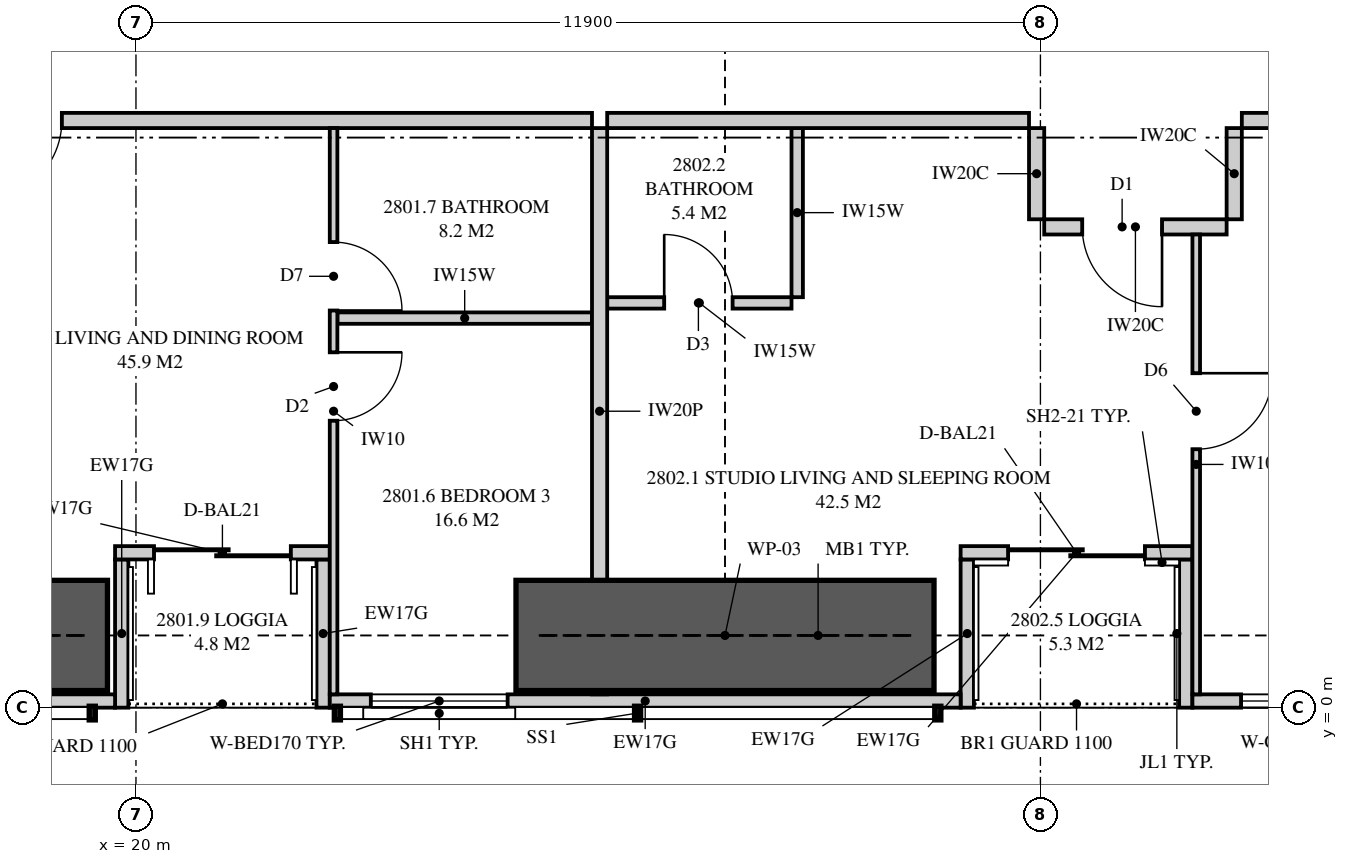
"""IFC4 building model, lengths in metres.
Left out: names, types, materials, properties, quantities, classifications, styles, units other than length and angle.
Written with IfcOpenShell. Run it as: python <this file> out.ifc"""

import sys

from ifc_helpers import new_model, si_unit, direction, frame, frame_2d, origin, place, context, subcontext, project, spatial, polyline, rectangle, outline, extrude, element, fill, save


model = new_model("IFC4")
c1 = context("Model", 3, precision=1e-05, world=origin(), true_north=direction((0.0, 1.0)))
c2 = subcontext(c1, "Body", "Model", "MODEL_VIEW")
j1 = project(units=[si_unit("LENGTHUNIT", "METRE"), si_unit("PLANEANGLEUNIT", "RADIAN")], contexts=[c1])
p1 = place(None, origin())
s1 = spatial("IfcSite", under=j1, at=p1, CompositionType="ELEMENT")
p2 = place(p1, origin())
s2 = spatial("IfcBuilding", under=s1, at=p2, CompositionType="ELEMENT")
p3 = place(p2, frame((0.0, 0.0, 104.85)))
s3 = spatial("IfcBuildingStorey", under=s2, at=p3, CompositionType="ELEMENT", Elevation=104.85)
p4 = place(p3, frame((9.051, 0.087, 0.0), z_axis=(0.0, 0.0, 1.0), x_axis=(1.0, 0.0, 0.0)))
e1 = element("IfcWall", 1, at=p4, inside=s3, PredefinedType="SOLIDWALL", context=c2, shape_type="SweptSolid", body=[
    extrude(outline(polyline([(0.0, 0.0), (10.674, 0.0), (10.674, 2.15), (7.824, 2.15), (7.824, 3.11), (7.666, 3.11), (7.666, 2.15), (7.62, 2.15), (7.62, 3.11), (0.0, 3.11), (0.0, 0.0)])), frame((0.0, 0.087, 0.0), z_axis=(0.0, -1.0, 0.0), x_axis=(1.0, 0.0, 0.0)), (0.0, 0.0, 1.0), 0.175),
])
p5 = place(p4, frame((2.349, 0.0, 0.4)))
e2 = element("IfcOpeningElement", 2, at=p5, cuts=e1, PredefinedType="OPENING", context=c2, shape_type="SweptSolid", body=[
    extrude(rectangle(XDim=1.8, YDim=1.7, at=frame_2d((0.9, 0.85))), frame((0.0, 0.097, 0.0), z_axis=(0.0, -1.0, 0.0), x_axis=(1.0, 0.0, 0.0)), (0.0, 0.0, 1.0), 0.195),
])
p6 = place(p3, frame((22.55, 0.087, 0.0), z_axis=(0.0, 0.0, 1.0), x_axis=(1.0, 0.0, 0.0)))
e3 = element("IfcWall", 3, at=p6, inside=s3, PredefinedType="SOLIDWALL", context=c2, shape_type="SweptSolid", body=[
    extrude(rectangle(XDim=8.3, YDim=0.175, at=frame_2d((4.15, 0.0))), origin(), (0.0, 0.0, 1.0), 2.15),
])
p7 = place(p6, frame((0.54, 0.0, 0.4)))
e4 = element("IfcOpeningElement", 4, at=p7, cuts=e3, PredefinedType="OPENING", context=c2, shape_type="SweptSolid", body=[
    extrude(rectangle(XDim=1.8, YDim=1.7, at=frame_2d((0.9, 0.85))), frame((0.0, 0.097, 0.0), z_axis=(0.0, -1.0, 0.0), x_axis=(1.0, 0.0, 0.0)), (0.0, 0.0, 1.0), 0.195),
])
p8 = place(p3, frame((33.9, 0.087, 0.0), z_axis=(0.0, 0.0, 1.0), x_axis=(1.0, 0.0, 0.0)))
e5 = element("IfcWall", 5, at=p8, inside=s3, PredefinedType="SOLIDWALL", context=c2, shape_type="SweptSolid", body=[
    extrude(outline(polyline([(0.0, 0.0), (7.75, 0.0), (7.75, 3.11), (4.928, 3.11), (4.928, 2.15), (4.883, 2.15), (4.883, 3.11), (4.725, 3.11), (4.725, 2.15), (0.0, 2.15), (0.0, 0.0)])), frame((0.0, 0.087, 0.0), z_axis=(0.0, -1.0, 0.0), x_axis=(1.0, 0.0, 0.0)), (0.0, 0.0, 1.0), 0.175),
])
p9 = place(p8, frame((0.64, 0.0, 0.4)))
e6 = element("IfcOpeningElement", 6, at=p9, cuts=e5, PredefinedType="OPENING", context=c2, shape_type="SweptSolid", body=[
    extrude(rectangle(XDim=1.2, YDim=1.7, at=frame_2d((0.6, 0.85))), frame((0.0, 0.097, 0.0), z_axis=(0.0, -1.0, 0.0), x_axis=(1.0, 0.0, 0.0)), (0.0, 0.0, 1.0), 0.195),
])
p10 = place(p3, frame((19.725, 2.038, 0.0), z_axis=(0.0, 0.0, 1.0), x_axis=(1.0, 0.0, 0.0)))
e7 = element("IfcWall", 7, at=p10, inside=s3, PredefinedType="SOLIDWALL", context=c2, shape_type="SweptSolid", body=[
    extrude(rectangle(XDim=2.825, YDim=0.175, at=frame_2d((1.413, 0.0))), origin(), (0.0, 0.0, 1.0), 3.11),
])
p11 = place(p10, frame((0.512, 0.0, 0.0)))
e8 = element("IfcOpeningElement", 8, at=p11, cuts=e7, PredefinedType="OPENING", context=c2, shape_type="SweptSolid", body=[
    extrude(rectangle(XDim=1.8, YDim=2.1, at=frame_2d((0.9, 1.05))), frame((0.0, 0.097, 0.0), z_axis=(0.0, -1.0, 0.0), x_axis=(1.0, 0.0, 0.0)), (0.0, 0.0, 1.0), 0.195),
])
for number, where, z_axis, x_axis in (
    (9, (19.812, 0.0, 0.0), (0.0, 0.0, 1.0), (0.0, 1.0, 0.0)),
    (10, (22.462, 0.0, 0.0), (0.0, 0.0, 1.0), (0.0, 1.0, 0.0)),
):
    element("IfcWall", number, at=place(p3, frame(where, z_axis=z_axis, x_axis=x_axis)), inside=s3, PredefinedType="SOLIDWALL", context=c2, shape_type="SweptSolid", body=[
        extrude(outline(polyline([(0.0, 0.0), (1.95, 0.0), (1.95, 3.11), (1.75, 3.11), (1.75, 2.15), (0.15, 2.15), (0.15, 3.11), (0.0, 3.11), (0.0, 0.0)])), frame((0.0, 0.087, 0.0), z_axis=(0.0, -1.0, 0.0), x_axis=(1.0, 0.0, 0.0)), (0.0, 0.0, 1.0), 0.175),
    ])
p12 = place(p3, frame((30.85, 2.038, 0.0), z_axis=(0.0, 0.0, 1.0), x_axis=(1.0, 0.0, 0.0)))
e11 = element("IfcWall", 11, at=p12, inside=s3, PredefinedType="SOLIDWALL", context=c2, shape_type="SweptSolid", body=[
    extrude(rectangle(XDim=3.05, YDim=0.175, at=frame_2d((1.525, 0.0))), origin(), (0.0, 0.0, 1.0), 3.11),
])
p13 = place(p12, frame((0.625, 0.0, 0.0)))
e12 = element("IfcOpeningElement", 12, at=p13, cuts=e11, PredefinedType="OPENING", context=c2, shape_type="SweptSolid", body=[
    extrude(rectangle(XDim=1.8, YDim=2.1, at=frame_2d((0.9, 1.05))), frame((0.0, 0.097, 0.0), z_axis=(0.0, -1.0, 0.0), x_axis=(1.0, 0.0, 0.0)), (0.0, 0.0, 1.0), 0.195),
])
for number, where, z_axis, x_axis in (
    (13, (30.938, 0.0, 0.0), (0.0, 0.0, 1.0), (0.0, 1.0, 0.0)),
    (14, (33.812, 0.0, 0.0), (0.0, 0.0, 1.0), (0.0, 1.0, 0.0)),
):
    element("IfcWall", number, at=place(p3, frame(where, z_axis=z_axis, x_axis=x_axis)), inside=s3, PredefinedType="SOLIDWALL", context=c2, shape_type="SweptSolid", body=[
        extrude(outline(polyline([(0.0, 0.0), (1.95, 0.0), (1.95, 3.11), (1.75, 3.11), (1.75, 2.15), (0.15, 2.15), (0.15, 3.11), (0.0, 3.11), (0.0, 0.0)])), frame((0.0, 0.087, 0.0), z_axis=(0.0, -1.0, 0.0), x_axis=(1.0, 0.0, 0.0)), (0.0, 0.0, 1.0), 0.175),
    ])
p14 = place(p3, frame((26.1, 0.175, 0.0), z_axis=(0.0, 0.0, 1.0), x_axis=(0.0, 1.0, 0.0)))
e15 = element("IfcWall", 15, at=p14, inside=s3, PredefinedType="PARTITIONING", context=c2, shape_type="SweptSolid", body=[
    extrude(outline(polyline([(0.529, 2.15), (0.0, 2.15), (0.0, 0.0), (0.529, 0.0), (0.529, 0.376), (1.021, 0.376), (1.021, 0.0), (7.45, 0.0), (7.45, 3.11), (1.685, 3.11), (1.685, 2.15), (1.021, 2.15), (1.021, 1.774), (0.529, 1.774), (0.529, 2.15)])), frame((0.0, 0.1, 0.0), z_axis=(0.0, -1.0, 0.0), x_axis=(1.0, 0.0, 0.0)), (0.0, 0.0, 1.0), 0.2),
])
p15 = place(p3, frame((17.775, 7.725, 0.0), z_axis=(0.0, 0.0, 1.0), x_axis=(1.0, 0.0, 0.0)))
e16 = element("IfcWall", 16, at=p15, inside=s3, PredefinedType="PARTITIONING", context=c2, shape_type="SweptSolid", body=[
    extrude(rectangle(XDim=8.225, YDim=0.2, at=frame_2d((4.113, 0.0))), origin(), (0.0, 0.0, 1.0), 3.11),
])
p16 = place(p15, frame((0.2, 0.0, 0.0)))
e17 = element("IfcOpeningElement", 17, at=p16, cuts=e16, PredefinedType="OPENING", context=c2, shape_type="SweptSolid", body=[
    extrude(rectangle(XDim=1.05, YDim=2.2, at=frame_2d((0.525, 1.1))), frame((0.0, 0.11, 0.0), z_axis=(0.0, -1.0, 0.0), x_axis=(1.0, 0.0, 0.0)), (0.0, 0.0, 1.0), 0.22),
])
p17 = place(p3, frame((22.6, 0.175, 0.0), z_axis=(0.0, 0.0, 1.0), x_axis=(0.0, 1.0, 0.0)))
e18 = element("IfcWall", 18, at=p17, inside=s3, PredefinedType="PARTITIONING", context=c2, shape_type="SweptSolid", body=[
    extrude(outline(polyline([(0.0, 0.0), (7.45, 0.0), (7.45, 3.11), (1.635, 3.11), (1.635, 2.15), (0.0, 2.15), (0.0, 3.11), (0.0, 0.0)])), frame((0.0, 0.05, 0.0), z_axis=(0.0, -1.0, 0.0), x_axis=(1.0, 0.0, 0.0)), (0.0, 0.0, 1.0), 0.1),
])
p18 = place(p17, frame((3.6, 0.0, 0.0)))
e19 = element("IfcOpeningElement", 19, at=p18, cuts=e18, PredefinedType="OPENING", context=c2, shape_type="SweptSolid", body=[
    extrude(rectangle(XDim=0.9, YDim=2.1, at=frame_2d((0.45, 1.05))), frame((0.0, 0.06, 0.0), z_axis=(0.0, -1.0, 0.0), x_axis=(1.0, 0.0, 0.0)), (0.0, 0.0, 1.0), 0.12),
])
p19 = place(p17, frame((5.05, 0.0, 0.0)))
e20 = element("IfcOpeningElement", 20, at=p19, cuts=e18, PredefinedType="OPENING", context=c2, shape_type="SweptSolid", body=[
    extrude(rectangle(XDim=0.9, YDim=2.1, at=frame_2d((0.45, 1.05))), frame((0.0, 0.06, 0.0), z_axis=(0.0, -1.0, 0.0), x_axis=(1.0, 0.0, 0.0)), (0.0, 0.0, 1.0), 0.12),
])
p20 = place(p3, frame((22.65, 5.125, 0.0), z_axis=(0.0, 0.0, 1.0), x_axis=(1.0, 0.0, 0.0)))
e21 = element("IfcWall", 21, at=p20, inside=s3, PredefinedType="PLUMBINGWALL", context=c2, shape_type="SweptSolid", body=[
    extrude(rectangle(XDim=3.35, YDim=0.15, at=frame_2d((1.675, 0.0))), origin(), (0.0, 0.0, 1.0), 3.11),
])
p21 = place(p3, frame((26.2, 7.725, 0.0), z_axis=(0.0, 0.0, 1.0), x_axis=(1.0, 0.0, 0.0)))
e22 = element("IfcWall", 22, at=p21, inside=s3, PredefinedType="PARTITIONING", context=c2, shape_type="SweptSolid", body=[
    extrude(outline(polyline([(0.0, 0.0), (5.55, 0.0), (5.55, 3.11), (1.887, 3.11), (1.887, 2.541), (1.213, 2.541), (1.213, 3.11), (0.0, 3.11), (0.0, 0.0)])), frame((0.0, 0.1, 0.0), z_axis=(0.0, -1.0, 0.0), x_axis=(1.0, 0.0, 0.0)), (0.0, 0.0, 1.0), 0.2),
])
p22 = place(p3, frame((26.2, 5.325, 0.0), z_axis=(0.0, 0.0, 1.0), x_axis=(1.0, 0.0, 0.0)))
e23 = element("IfcWall", 23, at=p22, inside=s3, PredefinedType="PLUMBINGWALL", context=c2, shape_type="SweptSolid", body=[
    extrude(outline(polyline([(0.0, 0.0), (2.425, 0.0), (2.425, 3.11), (1.862, 3.11), (1.862, 2.541), (1.238, 2.541), (1.238, 3.11), (0.0, 3.11), (0.0, 0.0)])), frame((0.0, 0.075, 0.0), z_axis=(0.0, -1.0, 0.0), x_axis=(1.0, 0.0, 0.0)), (0.0, 0.0, 1.0), 0.15),
])
p23 = place(p22, frame((0.75, 0.0, 0.0)))
e24 = element("IfcOpeningElement", 24, at=p23, cuts=e23, PredefinedType="OPENING", context=c2, shape_type="SweptSolid", body=[
    extrude(rectangle(XDim=0.9, YDim=2.1, at=frame_2d((0.45, 1.05))), frame((0.0, 0.085, 0.0), z_axis=(0.0, -1.0, 0.0), x_axis=(1.0, 0.0, 0.0)), (0.0, 0.0, 1.0), 0.17),
])
p24 = place(p3, frame((28.7, 5.4, 0.0), z_axis=(0.0, 0.0, 1.0), x_axis=(0.0, 1.0, 0.0)))
e25 = element("IfcWall", 25, at=p24, inside=s3, PredefinedType="PLUMBINGWALL", context=c2, shape_type="SweptSolid", body=[
    extrude(rectangle(XDim=2.225, YDim=0.15, at=frame_2d((1.113, 0.0))), origin(), (0.0, 0.0, 1.0), 3.11),
])
p25 = place(p3, frame((33.95, 0.175, 0.0), z_axis=(0.0, 0.0, 1.0), x_axis=(0.0, 1.0, 0.0)))
e26 = element("IfcWall", 26, at=p25, inside=s3, PredefinedType="PARTITIONING", context=c2, shape_type="SweptSolid", body=[
    extrude(outline(polyline([(0.0, 0.0), (6.05, 0.0), (6.05, 3.11), (1.635, 3.11), (1.635, 2.15), (0.0, 2.15), (0.0, 3.11), (0.0, 0.0)])), frame((0.0, 0.05, 0.0), z_axis=(0.0, -1.0, 0.0), x_axis=(1.0, 0.0, 0.0)), (0.0, 0.0, 1.0), 0.1),
])
p26 = place(p25, frame((3.225, 0.0, 0.0)))
e27 = element("IfcOpeningElement", 27, at=p26, cuts=e26, PredefinedType="OPENING", context=c2, shape_type="SweptSolid", body=[
    extrude(rectangle(XDim=1.0, YDim=2.1, at=frame_2d((0.5, 1.05))), frame((0.0, 0.06, 0.0), z_axis=(0.0, -1.0, 0.0), x_axis=(1.0, 0.0, 0.0)), (0.0, 0.0, 1.0), 0.12),
])
p27 = place(p3, frame((34.55, 7.725, 0.0), z_axis=(0.0, 0.0, 1.0), x_axis=(1.0, 0.0, 0.0)))
e28 = element("IfcWall", 28, at=p27, inside=s3, PredefinedType="PARTITIONING", context=c2, shape_type="SweptSolid", body=[
    extrude(outline(polyline([(0.0, 0.0), (5.15, 0.0), (5.15, 3.11), (4.412, 3.11), (4.412, 2.541), (3.738, 2.541), (3.738, 3.11), (0.0, 3.11), (0.0, 0.0)])), frame((0.0, 0.1, 0.0), z_axis=(0.0, -1.0, 0.0), x_axis=(1.0, 0.0, 0.0)), (0.0, 0.0, 1.0), 0.2),
])
p28 = place(p3, frame((31.95, 6.325, 0.0), z_axis=(0.0, 0.0, 1.0), x_axis=(1.0, 0.0, 0.0)))
e29 = element("IfcWall", 29, at=p28, inside=s3, PredefinedType="PARTITIONING", context=c2, shape_type="SweptSolid", body=[
    extrude(rectangle(XDim=2.4, YDim=0.2, at=frame_2d((1.2, 0.0))), origin(), (0.0, 0.0, 1.0), 3.11),
])
p29 = place(p28, frame((0.5, 0.0, 0.0)))
e30 = element("IfcOpeningElement", 30, at=p29, cuts=e29, PredefinedType="OPENING", context=c2, shape_type="SweptSolid", body=[
    extrude(rectangle(XDim=1.05, YDim=2.2, at=frame_2d((0.525, 1.1))), frame((0.0, 0.11, 0.0), z_axis=(0.0, -1.0, 0.0), x_axis=(1.0, 0.0, 0.0)), (0.0, 0.0, 1.0), 0.22),
])
for number, where, z_axis, x_axis in (
    (31, (31.85, 7.625, 0.0), (0.0, 0.0, 1.0), (0.0, -1.0, 0.0)),
    (32, (34.45, 7.625, 0.0), (0.0, 0.0, 1.0), (0.0, -1.0, 0.0)),
):
    element("IfcWall", number, at=place(p3, frame(where, z_axis=z_axis, x_axis=x_axis)), inside=s3, PredefinedType="PARTITIONING", context=c2, shape_type="SweptSolid", body=[
        extrude(rectangle(XDim=1.2, YDim=0.2, at=frame_2d((0.6, 0.0))), origin(), (0.0, 0.0, 1.0), 3.11),
    ])
for number, where, z_axis, x_axis in (
    (33, (14.125, 0.95, 0.0), (0.0, 0.0, 1.0), (1.0, 0.0, 0.0)),
    (34, (25.0, 0.95, 0.0), (0.0, 0.0, 1.0), (1.0, 0.0, 0.0)),
):
    element("IfcWall", number, at=place(p3, frame(where, z_axis=z_axis, x_axis=x_axis)), inside=s3, PredefinedType="SHEAR", context=c2, shape_type="SweptSolid", body=[
        extrude(rectangle(XDim=5.5, YDim=1.45, at=frame_2d((2.75, 0.0))), origin(), (0.0, 0.0, 1.0), 3.35),
    ])
p30 = place(p11, origin())
e35 = element("IfcDoor", 35, at=p30, inside=s3, OperationType="SLIDING_TO_LEFT", PredefinedType="DOOR", context=c2, shape_type="SweptSolid", body=[
    extrude(rectangle(XDim=1.8, YDim=2.1, at=frame_2d((0.9, 1.05))), frame((0.0, 0.025, 0.0), z_axis=(0.0, -1.0, 0.0), x_axis=(1.0, 0.0, 0.0)), (0.0, 0.0, 1.0), 0.05),
])
fill(e8, e35)
p31 = place(p7, origin())
e36 = element("IfcWindow", 36, at=p31, inside=s3, PartitioningType="SINGLE_PANEL", PredefinedType="WINDOW", context=c2, shape_type="SweptSolid", body=[
    extrude(rectangle(XDim=1.8, YDim=1.7, at=frame_2d((0.9, 0.85))), frame((0.0, 0.03, 0.0), z_axis=(0.0, -1.0, 0.0), x_axis=(1.0, 0.0, 0.0)), (0.0, 0.0, 1.0), 0.06),
])
fill(e4, e36)
p32 = place(p13, origin())
e37 = element("IfcDoor", 37, at=p32, inside=s3, OperationType="SLIDING_TO_LEFT", PredefinedType="DOOR", context=c2, shape_type="SweptSolid", body=[
    extrude(rectangle(XDim=1.8, YDim=2.1, at=frame_2d((0.9, 1.05))), frame((0.0, 0.025, 0.0), z_axis=(0.0, -1.0, 0.0), x_axis=(1.0, 0.0, 0.0)), (0.0, 0.0, 1.0), 0.05),
])
fill(e12, e37)
p33 = place(p9, origin())
e38 = element("IfcWindow", 38, at=p33, inside=s3, PartitioningType="SINGLE_PANEL", PredefinedType="WINDOW", context=c2, shape_type="SweptSolid", body=[
    extrude(rectangle(XDim=1.2, YDim=1.7, at=frame_2d((0.6, 0.85))), frame((0.0, 0.03, 0.0), z_axis=(0.0, -1.0, 0.0), x_axis=(1.0, 0.0, 0.0)), (0.0, 0.0, 1.0), 0.06),
])
fill(e6, e38)
p34 = place(p16, frame((1.05, 0.0, 0.0), z_axis=(0.0, 0.0, 1.0), x_axis=(-1.0, 0.0, 0.0)))
e39 = element("IfcDoor", 39, at=p34, inside=s3, OperationType="SINGLE_SWING_RIGHT", PredefinedType="DOOR", context=c2, shape_type="SweptSolid", body=[
    extrude(rectangle(XDim=1.05, YDim=2.2, at=frame_2d((0.525, 1.1))), frame((0.0, 0.025, 0.0), z_axis=(0.0, -1.0, 0.0), x_axis=(1.0, 0.0, 0.0)), (0.0, 0.0, 1.0), 0.05),
])
fill(e17, e39)
p35 = place(p18, frame((0.9, 0.0, 0.0), z_axis=(0.0, 0.0, 1.0), x_axis=(-1.0, 0.0, 0.0)))
e40 = element("IfcDoor", 40, at=p35, inside=s3, OperationType="SINGLE_SWING_LEFT", PredefinedType="DOOR", context=c2, shape_type="SweptSolid", body=[
    extrude(rectangle(XDim=0.9, YDim=2.1, at=frame_2d((0.45, 1.05))), frame((0.0, 0.025, 0.0), z_axis=(0.0, -1.0, 0.0), x_axis=(1.0, 0.0, 0.0)), (0.0, 0.0, 1.0), 0.05),
])
fill(e19, e40)
p36 = place(p19, frame((0.9, 0.0, 0.0), z_axis=(0.0, 0.0, 1.0), x_axis=(-1.0, 0.0, 0.0)))
e41 = element("IfcDoor", 41, at=p36, inside=s3, OperationType="SINGLE_SWING_RIGHT", PredefinedType="DOOR", context=c2, shape_type="SweptSolid", body=[
    extrude(rectangle(XDim=0.9, YDim=2.1, at=frame_2d((0.45, 1.05))), frame((0.0, 0.025, 0.0), z_axis=(0.0, -1.0, 0.0), x_axis=(1.0, 0.0, 0.0)), (0.0, 0.0, 1.0), 0.05),
])
fill(e20, e41)
p37 = place(p29, frame((1.05, 0.0, 0.0), z_axis=(0.0, 0.0, 1.0), x_axis=(-1.0, 0.0, 0.0)))
e42 = element("IfcDoor", 42, at=p37, inside=s3, OperationType="SINGLE_SWING_LEFT", PredefinedType="DOOR", context=c2, shape_type="SweptSolid", body=[
    extrude(rectangle(XDim=1.05, YDim=2.2, at=frame_2d((0.525, 1.1))), frame((0.0, 0.025, 0.0), z_axis=(0.0, -1.0, 0.0), x_axis=(1.0, 0.0, 0.0)), (0.0, 0.0, 1.0), 0.05),
])
fill(e30, e42)
p38 = place(p23, origin())
e43 = element("IfcDoor", 43, at=p38, inside=s3, OperationType="SINGLE_SWING_LEFT", PredefinedType="DOOR", context=c2, shape_type="SweptSolid", body=[
    extrude(rectangle(XDim=0.9, YDim=2.1, at=frame_2d((0.45, 1.05))), frame((0.0, 0.025, 0.0), z_axis=(0.0, -1.0, 0.0), x_axis=(1.0, 0.0, 0.0)), (0.0, 0.0, 1.0), 0.05),
])
fill(e24, e43)
p39 = place(p26, frame((1.0, 0.0, 0.0), z_axis=(0.0, 0.0, 1.0), x_axis=(-1.0, 0.0, 0.0)))
e44 = element("IfcDoor", 44, at=p39, inside=s3, OperationType="SINGLE_SWING_LEFT", PredefinedType="DOOR", context=c2, shape_type="SweptSolid", body=[
    extrude(rectangle(XDim=1.0, YDim=2.1, at=frame_2d((0.5, 1.05))), frame((0.0, 0.025, 0.0), z_axis=(0.0, -1.0, 0.0), x_axis=(1.0, 0.0, 0.0)), (0.0, 0.0, 1.0), 0.05),
])
fill(e27, e44)
save(model, sys.argv[1])
